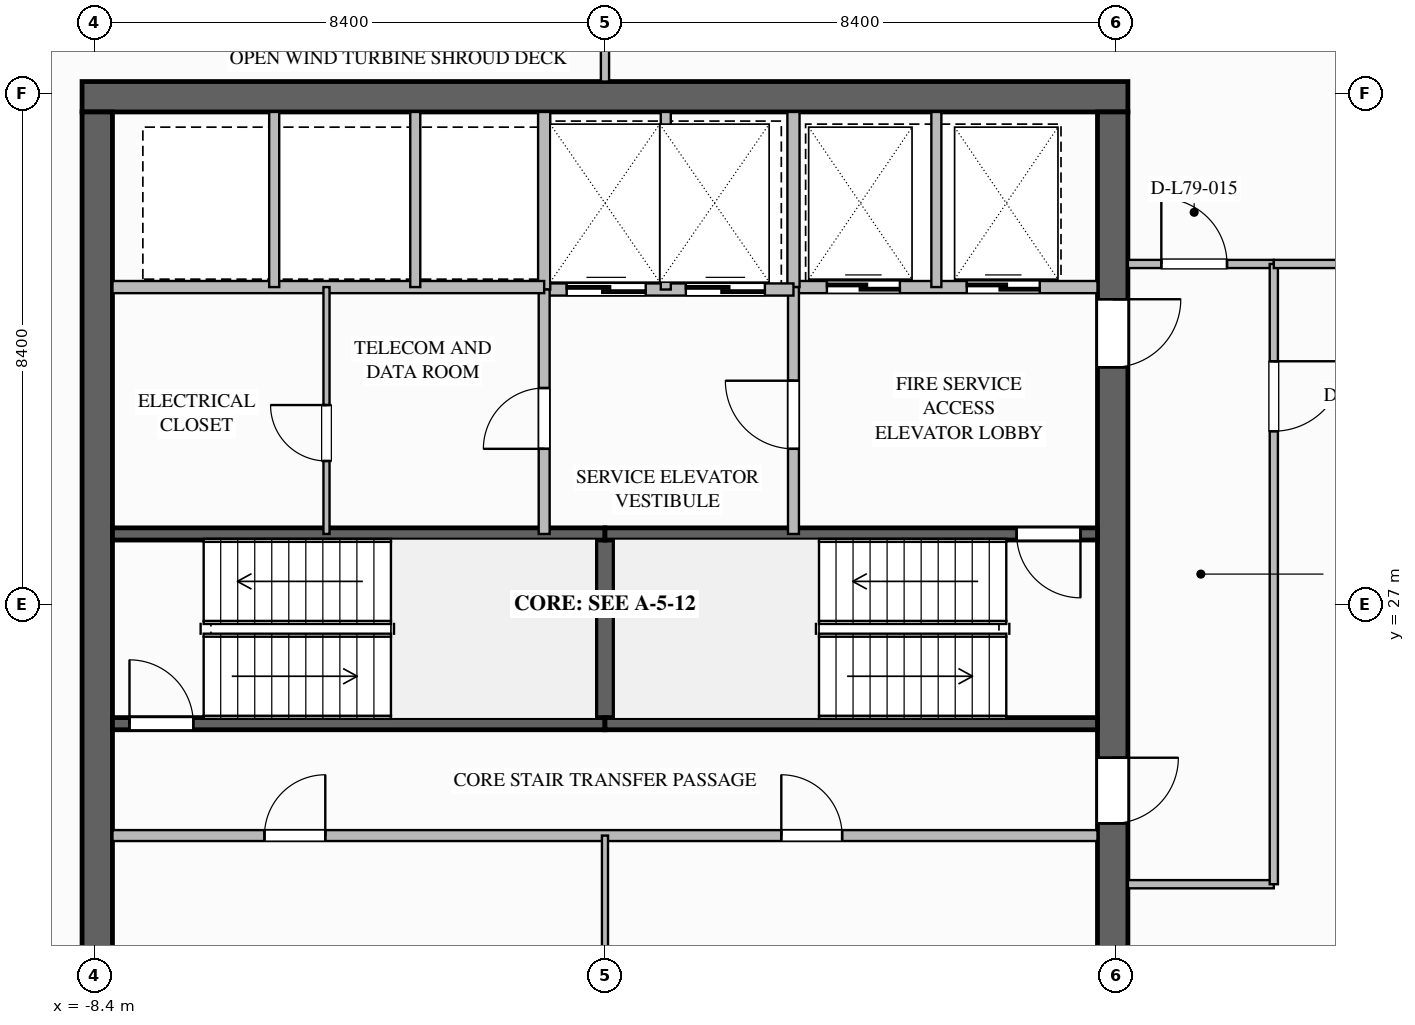
"""IFC4 building model, lengths in metres.
Left out: names, types, materials, properties, quantities, classifications, styles, units other than length and angle.
Written with IfcOpenShell. Run it as: python <this file> out.ifc"""

import sys

from ifc_helpers import new_model, si_unit, direction, frame, frame_2d, origin, place, context, subcontext, project, spatial, rectangle, extrude, element, fill, save


model = new_model("IFC4")
c1 = context("Model", 3, precision=1e-05, world=origin(), true_north=direction((0.0, 1.0)))
c2 = subcontext(c1, "Body", "Model", "MODEL_VIEW")
j1 = project(units=[si_unit("LENGTHUNIT", "METRE"), si_unit("PLANEANGLEUNIT", "RADIAN")], contexts=[c1])
p1 = place(None, origin())
s1 = spatial("IfcSite", under=j1, at=p1, CompositionType="ELEMENT")
p2 = place(p1, origin())
s2 = spatial("IfcBuilding", under=s1, at=p2, CompositionType="ELEMENT")
p3 = place(p2, frame((0.0, 0.0, 303.0)))
s3 = spatial("IfcBuildingStorey", under=s2, at=p3, CompositionType="ELEMENT", Elevation=303.0)
p4 = place(p3, frame((-8.6, 35.35, 0.0), z_axis=(0.0, 0.0, 1.0), x_axis=(1.0, 0.0, 0.0)))
e1 = element("IfcWall", 1, at=p4, inside=s3, PredefinedType="SHEAR", context=c2, shape_type="SweptSolid", body=[
    extrude(rectangle(XDim=17.2, YDim=0.5, at=frame_2d((8.6, 0.0))), origin(), (0.0, 0.0, 1.0), 4.2),
])
p5 = place(p3, frame((8.35, 35.1, 0.0), z_axis=(0.0, 0.0, 1.0), x_axis=(0.0, -1.0, 0.0)))
e2 = element("IfcWall", 2, at=p5, inside=s3, PredefinedType="SHEAR", context=c2, shape_type="SweptSolid", body=[
    extrude(rectangle(XDim=16.2, YDim=0.5, at=frame_2d((8.1, 0.0))), origin(), (0.0, 0.0, 1.0), 4.2),
])
p6 = place(p5, frame((3.08, 0.0, 0.0)))
e3 = element("IfcOpeningElement", 3, at=p6, cuts=e2, PredefinedType="OPENING", context=c2, shape_type="SweptSolid", body=[
    extrude(rectangle(XDim=1.12, YDim=2.1, at=frame_2d((0.56, 1.05))), frame((0.0, 0.26, 0.0), z_axis=(0.0, -1.0, 0.0), x_axis=(1.0, 0.0, 0.0)), (0.0, 0.0, 1.0), 0.52),
])
p7 = place(p5, frame((10.62, 0.0, 0.0)))
e4 = element("IfcOpeningElement", 4, at=p7, cuts=e2, PredefinedType="OPENING", context=c2, shape_type="SweptSolid", body=[
    extrude(rectangle(XDim=1.08, YDim=2.04, at=frame_2d((0.54, 1.02))), frame((0.0, 0.26, 0.0), z_axis=(0.0, -1.0, 0.0), x_axis=(1.0, 0.0, 0.0)), (0.0, 0.0, 1.0), 0.52),
])
p8 = place(p3, frame((-8.35, 18.9, 0.0), z_axis=(0.0, 0.0, 1.0), x_axis=(0.0, 1.0, 0.0)))
e5 = element("IfcWall", 5, at=p8, inside=s3, PredefinedType="SHEAR", context=c2, shape_type="SweptSolid", body=[
    extrude(rectangle(XDim=16.2, YDim=0.5, at=frame_2d((8.1, 0.0))), origin(), (0.0, 0.0, 1.0), 4.2),
])
p9 = place(p3, frame((0.0, 25.04, 0.0), z_axis=(0.0, 0.0, 1.0), x_axis=(0.0, 1.0, 0.0)))
e6 = element("IfcWall", 6, at=p9, inside=s3, PredefinedType="SOLIDWALL", context=c2, shape_type="SweptSolid", body=[
    extrude(rectangle(XDim=3.12, YDim=0.3, at=frame_2d((1.56, 0.0))), origin(), (0.0, 0.0, 1.0), 3.85),
])
p10 = place(p3, frame((-8.1, 25.04, 0.0), z_axis=(0.0, 0.0, 1.0), x_axis=(1.0, 0.0, 0.0)))
e7 = element("IfcWall", 7, at=p10, inside=s3, PredefinedType="SOLIDWALL", context=c2, shape_type="SweptSolid", body=[
    extrude(rectangle(XDim=8.1, YDim=0.2, at=frame_2d((4.05, 0.0))), origin(), (0.0, 0.0, 1.0), 3.85),
])
p11 = place(p10, frame((0.28, 0.0, 0.0)))
e8 = element("IfcOpeningElement", 8, at=p11, cuts=e7, PredefinedType="OPENING", context=c2, shape_type="SweptSolid", body=[
    extrude(rectangle(XDim=1.05, YDim=2.1, at=frame_2d((0.525, 1.05))), frame((0.0, 0.11, 0.0), z_axis=(0.0, -1.0, 0.0), x_axis=(1.0, 0.0, 0.0)), (0.0, 0.0, 1.0), 0.22),
])
for number, where, z_axis, x_axis in (
    (9, (-8.1, 28.16, 0.0), (0.0, 0.0, 1.0), (1.0, 0.0, 0.0)),
    (10, (0.0, 25.04, 0.0), (0.0, 0.0, 1.0), (1.0, 0.0, 0.0)),
):
    element("IfcWall", number, at=place(p3, frame(where, z_axis=z_axis, x_axis=x_axis)), inside=s3, PredefinedType="SOLIDWALL", context=c2, shape_type="SweptSolid", body=[
        extrude(rectangle(XDim=8.1, YDim=0.2, at=frame_2d((4.05, 0.0))), origin(), (0.0, 0.0, 1.0), 3.85),
    ])
p12 = place(p3, frame((8.1, 28.16, 0.0), z_axis=(0.0, 0.0, 1.0), x_axis=(-1.0, 0.0, 0.0)))
e11 = element("IfcWall", 11, at=p12, inside=s3, PredefinedType="SOLIDWALL", context=c2, shape_type="SweptSolid", body=[
    extrude(rectangle(XDim=8.1, YDim=0.2, at=frame_2d((4.05, 0.0))), origin(), (0.0, 0.0, 1.0), 3.85),
])
p13 = place(p12, frame((0.28, 0.0, 0.0)))
e12 = element("IfcOpeningElement", 12, at=p13, cuts=e11, PredefinedType="OPENING", context=c2, shape_type="SweptSolid", body=[
    extrude(rectangle(XDim=1.05, YDim=2.1, at=frame_2d((0.525, 1.05))), frame((0.0, 0.11, 0.0), z_axis=(0.0, -1.0, 0.0), x_axis=(1.0, 0.0, 0.0)), (0.0, 0.0, 1.0), 0.22),
])
p14 = place(p3, frame((3.1, 32.22, 0.0), z_axis=(0.0, 0.0, 1.0), x_axis=(1.0, 0.0, 0.0)))
e13 = element("IfcWall", 13, at=p14, inside=s3, PredefinedType="SOLIDWALL", context=c2, shape_type="SweptSolid", body=[
    extrude(rectangle(XDim=5.0, YDim=0.2, at=frame_2d((2.5, 0.0))), origin(), (0.0, 0.0, 1.0), 3.85),
])
p15 = place(p14, frame((0.55, 0.0, 0.0)))
e14 = element("IfcOpeningElement", 14, at=p15, cuts=e13, PredefinedType="OPENING", context=c2, shape_type="SweptSolid", body=[
    extrude(rectangle(XDim=1.2, YDim=2.2, at=frame_2d((0.6, 1.1))), frame((0.0, 0.11, 0.0), z_axis=(0.0, -1.0, 0.0), x_axis=(1.0, 0.0, 0.0)), (0.0, 0.0, 1.0), 0.22),
])
p16 = place(p14, frame((2.85, 0.0, 0.0)))
e15 = element("IfcOpeningElement", 15, at=p16, cuts=e13, PredefinedType="OPENING", context=c2, shape_type="SweptSolid", body=[
    extrude(rectangle(XDim=1.2, YDim=2.2, at=frame_2d((0.6, 1.1))), frame((0.0, 0.11, 0.0), z_axis=(0.0, -1.0, 0.0), x_axis=(1.0, 0.0, 0.0)), (0.0, 0.0, 1.0), 0.22),
])
p17 = place(p3, frame((3.1, 32.22, 0.0), z_axis=(0.0, 0.0, 1.0), x_axis=(0.0, 1.0, 0.0)))
e16 = element("IfcWall", 16, at=p17, inside=s3, PredefinedType="SOLIDWALL", context=c2, shape_type="SweptSolid", body=[
    extrude(rectangle(XDim=2.88, YDim=0.2, at=frame_2d((1.44, 0.0))), origin(), (0.0, 0.0, 1.0), 3.85),
])
p18 = place(p3, frame((5.45, 32.22, 0.0), z_axis=(0.0, 0.0, 1.0), x_axis=(0.0, 1.0, 0.0)))
e17 = element("IfcWall", 17, at=p18, inside=s3, PredefinedType="PARTITIONING", context=c2, shape_type="SweptSolid", body=[
    extrude(rectangle(XDim=2.88, YDim=0.165, at=frame_2d((1.44, 0.0))), origin(), (0.0, 0.0, 1.0), 3.85),
])
p19 = place(p3, frame((3.1, 28.16, 0.0), z_axis=(0.0, 0.0, 1.0), x_axis=(0.0, 1.0, 0.0)))
e18 = element("IfcWall", 18, at=p19, inside=s3, PredefinedType="SOLIDWALL", context=c2, shape_type="SweptSolid", body=[
    extrude(rectangle(XDim=4.06, YDim=0.18, at=frame_2d((2.03, 0.0))), origin(), (0.0, 0.0, 1.0), 3.85),
])
p20 = place(p19, frame((1.4, 0.0, 0.0)))
e19 = element("IfcOpeningElement", 19, at=p20, cuts=e18, PredefinedType="OPENING", context=c2, shape_type="SweptSolid", body=[
    extrude(rectangle(XDim=1.12, YDim=2.1, at=frame_2d((0.56, 1.05))), frame((0.0, 0.1, 0.0), z_axis=(0.0, -1.0, 0.0), x_axis=(1.0, 0.0, 0.0)), (0.0, 0.0, 1.0), 0.2),
])
p21 = place(p3, frame((-1.0, 32.18, 0.0), z_axis=(0.0, 0.0, 1.0), x_axis=(1.0, 0.0, 0.0)))
e20 = element("IfcWall", 20, at=p21, inside=s3, PredefinedType="SOLIDWALL", context=c2, shape_type="SweptSolid", body=[
    extrude(rectangle(XDim=4.1, YDim=0.2, at=frame_2d((2.05, 0.0))), origin(), (0.0, 0.0, 1.0), 3.85),
])
p22 = place(p21, frame((0.37, 0.0, 0.0)))
e21 = element("IfcOpeningElement", 21, at=p22, cuts=e20, PredefinedType="OPENING", context=c2, shape_type="SweptSolid", body=[
    extrude(rectangle(XDim=1.3, YDim=2.2, at=frame_2d((0.65, 1.1))), frame((0.0, 0.11, 0.0), z_axis=(0.0, -1.0, 0.0), x_axis=(1.0, 0.0, 0.0)), (0.0, 0.0, 1.0), 0.22),
])
p23 = place(p21, frame((2.33, 0.0, 0.0)))
e22 = element("IfcOpeningElement", 22, at=p23, cuts=e20, PredefinedType="OPENING", context=c2, shape_type="SweptSolid", body=[
    extrude(rectangle(XDim=1.3, YDim=2.2, at=frame_2d((0.65, 1.1))), frame((0.0, 0.11, 0.0), z_axis=(0.0, -1.0, 0.0), x_axis=(1.0, 0.0, 0.0)), (0.0, 0.0, 1.0), 0.22),
])
p24 = place(p3, frame((-1.0, 32.18, 0.0), z_axis=(0.0, 0.0, 1.0), x_axis=(0.0, 1.0, 0.0)))
e23 = element("IfcWall", 23, at=p24, inside=s3, PredefinedType="SOLIDWALL", context=c2, shape_type="SweptSolid", body=[
    extrude(rectangle(XDim=2.92, YDim=0.2, at=frame_2d((1.46, 0.0))), origin(), (0.0, 0.0, 1.0), 3.85),
])
p25 = place(p3, frame((1.0, 32.18, 0.0), z_axis=(0.0, 0.0, 1.0), x_axis=(0.0, 1.0, 0.0)))
e24 = element("IfcWall", 24, at=p25, inside=s3, PredefinedType="PARTITIONING", context=c2, shape_type="SweptSolid", body=[
    extrude(rectangle(XDim=2.92, YDim=0.165, at=frame_2d((1.46, 0.0))), origin(), (0.0, 0.0, 1.0), 3.85),
])
p26 = place(p3, frame((-1.0, 28.16, 0.0), z_axis=(0.0, 0.0, 1.0), x_axis=(0.0, 1.0, 0.0)))
e25 = element("IfcWall", 25, at=p26, inside=s3, PredefinedType="SOLIDWALL", context=c2, shape_type="SweptSolid", body=[
    extrude(rectangle(XDim=4.02, YDim=0.18, at=frame_2d((2.01, 0.0))), origin(), (0.0, 0.0, 1.0), 3.85),
])
p27 = place(p26, frame((1.4, 0.0, 0.0)))
e26 = element("IfcOpeningElement", 26, at=p27, cuts=e25, PredefinedType="OPENING", context=c2, shape_type="SweptSolid", body=[
    extrude(rectangle(XDim=1.0, YDim=2.1, at=frame_2d((0.5, 1.05))), frame((0.0, 0.1, 0.0), z_axis=(0.0, -1.0, 0.0), x_axis=(1.0, 0.0, 0.0)), (0.0, 0.0, 1.0), 0.2),
])
p28 = place(p3, frame((-8.1, 32.22, 0.0), z_axis=(0.0, 0.0, 1.0), x_axis=(1.0, 0.0, 0.0)))
e27 = element("IfcWall", 27, at=p28, inside=s3, PredefinedType="SOLIDWALL", context=c2, shape_type="SweptSolid", body=[
    extrude(rectangle(XDim=7.1, YDim=0.2, at=frame_2d((3.55, 0.0))), origin(), (0.0, 0.0, 1.0), 3.85),
])
for number, where, z_axis, x_axis in (
    (28, (-5.44, 32.22, 0.0), (0.0, 0.0, 1.0), (0.0, 1.0, 0.0)),
    (29, (-3.12, 32.22, 0.0), (0.0, 0.0, 1.0), (0.0, 1.0, 0.0)),
):
    element("IfcWall", number, at=place(p3, frame(where, z_axis=z_axis, x_axis=x_axis)), inside=s3, PredefinedType="PARTITIONING", context=c2, shape_type="SweptSolid", body=[
        extrude(rectangle(XDim=2.88, YDim=0.165, at=frame_2d((1.44, 0.0))), origin(), (0.0, 0.0, 1.0), 3.85),
    ])
p29 = place(p3, frame((-4.58, 28.16, 0.0), z_axis=(0.0, 0.0, 1.0), x_axis=(0.0, 1.0, 0.0)))
e30 = element("IfcWall", 30, at=p29, inside=s3, PredefinedType="PARTITIONING", context=c2, shape_type="SweptSolid", body=[
    extrude(rectangle(XDim=4.06, YDim=0.1, at=frame_2d((2.03, 0.0))), origin(), (0.0, 0.0, 1.0), 3.85),
])
p30 = place(p29, frame((1.2, 0.0, 0.0)))
e31 = element("IfcOpeningElement", 31, at=p30, cuts=e30, PredefinedType="OPENING", context=c2, shape_type="SweptSolid", body=[
    extrude(rectangle(XDim=0.92, YDim=2.1, at=frame_2d((0.46, 1.05))), frame((0.0, 0.06, 0.0), z_axis=(0.0, -1.0, 0.0), x_axis=(1.0, 0.0, 0.0)), (0.0, 0.0, 1.0), 0.12),
])
p31 = place(p3, frame((-8.1, 23.2, 0.0), z_axis=(0.0, 0.0, 1.0), x_axis=(1.0, 0.0, 0.0)))
e32 = element("IfcWall", 32, at=p31, inside=s3, PredefinedType="SOLIDWALL", context=c2, shape_type="SweptSolid", body=[
    extrude(rectangle(XDim=16.2, YDim=0.18, at=frame_2d((8.1, 0.0))), origin(), (0.0, 0.0, 1.0), 3.85),
])
p32 = place(p31, frame((2.5, 0.0, 0.0)))
e33 = element("IfcOpeningElement", 33, at=p32, cuts=e32, PredefinedType="OPENING", context=c2, shape_type="SweptSolid", body=[
    extrude(rectangle(XDim=1.0, YDim=2.1, at=frame_2d((0.5, 1.05))), frame((0.0, 0.1, 0.0), z_axis=(0.0, -1.0, 0.0), x_axis=(1.0, 0.0, 0.0)), (0.0, 0.0, 1.0), 0.2),
])
p33 = place(p31, frame((11.0, 0.0, 0.0)))
e34 = element("IfcOpeningElement", 34, at=p33, cuts=e32, PredefinedType="OPENING", context=c2, shape_type="SweptSolid", body=[
    extrude(rectangle(XDim=1.0, YDim=2.1, at=frame_2d((0.5, 1.05))), frame((0.0, 0.1, 0.0), z_axis=(0.0, -1.0, 0.0), x_axis=(1.0, 0.0, 0.0)), (0.0, 0.0, 1.0), 0.2),
])
p34 = place(p3, frame((0.0, 18.9, 0.0), z_axis=(0.0, 0.0, 1.0), x_axis=(0.0, 1.0, 0.0)))
e35 = element("IfcWall", 35, at=p34, inside=s3, PredefinedType="PARTITIONING", context=c2, shape_type="SweptSolid", body=[
    extrude(rectangle(XDim=4.3, YDim=0.1, at=frame_2d((2.15, 0.0))), origin(), (0.0, 0.0, 1.0), 3.85),
])
p35 = place(p3, frame((8.6, 22.4, 0.0), z_axis=(0.0, 0.0, 1.0), x_axis=(1.0, 0.0, 0.0)))
e36 = element("IfcWall", 36, at=p35, inside=s3, PredefinedType="PARTITIONING", context=c2, shape_type="SweptSolid", body=[
    extrude(rectangle(XDim=2.4, YDim=0.135, at=frame_2d((1.2, 0.0))), origin(), (0.0, 0.0, 1.0), 3.85),
])
p36 = place(p3, frame((8.6, 32.6, 0.0), z_axis=(0.0, 0.0, 1.0), x_axis=(1.0, 0.0, 0.0)))
e37 = element("IfcWall", 37, at=p36, inside=s3, PredefinedType="PARTITIONING", context=c2, shape_type="SweptSolid", body=[
    extrude(rectangle(XDim=2.4, YDim=0.135, at=frame_2d((1.2, 0.0))), origin(), (0.0, 0.0, 1.0), 3.85),
])
p37 = place(p36, frame((0.55, 0.0, 0.0)))
e38 = element("IfcOpeningElement", 38, at=p37, cuts=e37, PredefinedType="OPENING", context=c2, shape_type="SweptSolid", body=[
    extrude(rectangle(XDim=1.08, YDim=2.04, at=frame_2d((0.54, 1.02))), frame((0.0, 0.077, 0.0), z_axis=(0.0, -1.0, 0.0), x_axis=(1.0, 0.0, 0.0)), (0.0, 0.0, 1.0), 0.155),
])
p38 = place(p3, frame((11.0, 32.6, 0.0), z_axis=(0.0, 0.0, 1.0), x_axis=(0.0, -1.0, 0.0)))
e39 = element("IfcWall", 39, at=p38, inside=s3, PredefinedType="PARTITIONING", context=c2, shape_type="SweptSolid", body=[
    extrude(rectangle(XDim=10.2, YDim=0.135, at=frame_2d((5.1, 0.0))), origin(), (0.0, 0.0, 1.0), 3.85),
])
p39 = place(p38, frame((1.6, 0.0, 0.0)))
e40 = element("IfcOpeningElement", 40, at=p39, cuts=e39, PredefinedType="OPENING", context=c2, shape_type="SweptSolid", body=[
    extrude(rectangle(XDim=1.15, YDim=2.15, at=frame_2d((0.575, 1.075))), frame((0.0, 0.077, 0.0), z_axis=(0.0, -1.0, 0.0), x_axis=(1.0, 0.0, 0.0)), (0.0, 0.0, 1.0), 0.155),
])
p40 = place(p3, frame((11.0, 32.6, 0.0), z_axis=(0.0, 0.0, 1.0), x_axis=(1.0, 0.0, 0.0)))
e41 = element("IfcWall", 41, at=p40, inside=s3, PredefinedType="PARTITIONING", context=c2, shape_type="SweptSolid", body=[
    extrude(rectangle(XDim=4.8, YDim=0.135, at=frame_2d((2.4, 0.0))), origin(), (0.0, 0.0, 1.0), 3.85),
])
p41 = place(p3, frame((0.0, 35.6, 0.0), z_axis=(0.0, 0.0, 1.0), x_axis=(0.0, 1.0, 0.0)))
e42 = element("IfcWall", 42, at=p41, inside=s3, PredefinedType="PARTITIONING", context=c2, shape_type="SweptSolid", body=[
    extrude(rectangle(XDim=7.2, YDim=0.135, at=frame_2d((3.6, 0.0))), origin(), (0.0, 0.0, 1.0), 3.227),
])
p42 = place(p41, frame((2.2, 0.0, 0.0)))
e43 = element("IfcOpeningElement", 43, at=p42, cuts=e42, PredefinedType="OPENING", context=c2, shape_type="SweptSolid", body=[
    extrude(rectangle(XDim=1.36, YDim=2.2, at=frame_2d((0.68, 1.1))), frame((0.0, 0.077, 0.0), z_axis=(0.0, -1.0, 0.0), x_axis=(1.0, 0.0, 0.0)), (0.0, 0.0, 1.0), 0.155),
])
p43 = place(p11, origin())
e44 = element("IfcDoor", 44, at=p43, inside=s3, OperationType="SINGLE_SWING_LEFT", PredefinedType="DOOR", context=c2, shape_type="SweptSolid", body=[
    extrude(rectangle(XDim=1.05, YDim=2.1, at=frame_2d((0.525, 1.05))), frame((0.0, 0.025, 0.0), z_axis=(0.0, -1.0, 0.0), x_axis=(1.0, 0.0, 0.0)), (0.0, 0.0, 1.0), 0.05),
])
fill(e8, e44)
p44 = place(p13, origin())
e45 = element("IfcDoor", 45, at=p44, inside=s3, OperationType="SINGLE_SWING_LEFT", PredefinedType="DOOR", context=c2, shape_type="SweptSolid", body=[
    extrude(rectangle(XDim=1.05, YDim=2.1, at=frame_2d((0.525, 1.05))), frame((0.0, 0.025, 0.0), z_axis=(0.0, -1.0, 0.0), x_axis=(1.0, 0.0, 0.0)), (0.0, 0.0, 1.0), 0.05),
])
fill(e12, e45)
p45 = place(p15, origin())
e46 = element("IfcDoor", 46, at=p45, inside=s3, OperationType="SLIDING_TO_LEFT", PredefinedType="DOOR", context=c2, shape_type="SweptSolid", body=[
    extrude(rectangle(XDim=1.2, YDim=2.2, at=frame_2d((0.6, 1.1))), frame((0.0, 0.025, 0.0), z_axis=(0.0, -1.0, 0.0), x_axis=(1.0, 0.0, 0.0)), (0.0, 0.0, 1.0), 0.05),
])
fill(e14, e46)
p46 = place(p16, origin())
e47 = element("IfcDoor", 47, at=p46, inside=s3, OperationType="SLIDING_TO_LEFT", PredefinedType="DOOR", context=c2, shape_type="SweptSolid", body=[
    extrude(rectangle(XDim=1.2, YDim=2.2, at=frame_2d((0.6, 1.1))), frame((0.0, 0.025, 0.0), z_axis=(0.0, -1.0, 0.0), x_axis=(1.0, 0.0, 0.0)), (0.0, 0.0, 1.0), 0.05),
])
fill(e15, e47)
p47 = place(p20, origin())
e48 = element("IfcDoor", 48, at=p47, inside=s3, OperationType="SINGLE_SWING_RIGHT", PredefinedType="DOOR", context=c2, shape_type="SweptSolid", body=[
    extrude(rectangle(XDim=1.12, YDim=2.1, at=frame_2d((0.56, 1.05))), frame((0.0, 0.025, 0.0), z_axis=(0.0, -1.0, 0.0), x_axis=(1.0, 0.0, 0.0)), (0.0, 0.0, 1.0), 0.05),
])
fill(e19, e48)
p48 = place(p6, origin())
e49 = element("IfcDoor", 49, at=p48, inside=s3, OperationType="SINGLE_SWING_LEFT", PredefinedType="DOOR", context=c2, shape_type="SweptSolid", body=[
    extrude(rectangle(XDim=1.12, YDim=2.1, at=frame_2d((0.56, 1.05))), frame((0.0, 0.025, 0.0), z_axis=(0.0, -1.0, 0.0), x_axis=(1.0, 0.0, 0.0)), (0.0, 0.0, 1.0), 0.05),
])
fill(e3, e49)
p49 = place(p22, origin())
e50 = element("IfcDoor", 50, at=p49, inside=s3, OperationType="SLIDING_TO_LEFT", PredefinedType="DOOR", context=c2, shape_type="SweptSolid", body=[
    extrude(rectangle(XDim=1.3, YDim=2.2, at=frame_2d((0.65, 1.1))), frame((0.0, 0.025, 0.0), z_axis=(0.0, -1.0, 0.0), x_axis=(1.0, 0.0, 0.0)), (0.0, 0.0, 1.0), 0.05),
])
fill(e21, e50)
p50 = place(p23, origin())
e51 = element("IfcDoor", 51, at=p50, inside=s3, OperationType="SLIDING_TO_LEFT", PredefinedType="DOOR", context=c2, shape_type="SweptSolid", body=[
    extrude(rectangle(XDim=1.3, YDim=2.2, at=frame_2d((0.65, 1.1))), frame((0.0, 0.025, 0.0), z_axis=(0.0, -1.0, 0.0), x_axis=(1.0, 0.0, 0.0)), (0.0, 0.0, 1.0), 0.05),
])
fill(e22, e51)
p51 = place(p27, origin())
e52 = element("IfcDoor", 52, at=p51, inside=s3, OperationType="SINGLE_SWING_LEFT", PredefinedType="DOOR", context=c2, shape_type="SweptSolid", body=[
    extrude(rectangle(XDim=1.0, YDim=2.1, at=frame_2d((0.5, 1.05))), frame((0.0, 0.025, 0.0), z_axis=(0.0, -1.0, 0.0), x_axis=(1.0, 0.0, 0.0)), (0.0, 0.0, 1.0), 0.05),
])
fill(e26, e52)
p52 = place(p30, origin())
e53 = element("IfcDoor", 53, at=p52, inside=s3, OperationType="SINGLE_SWING_RIGHT", PredefinedType="DOOR", context=c2, shape_type="SweptSolid", body=[
    extrude(rectangle(XDim=0.92, YDim=2.1, at=frame_2d((0.46, 1.05))), frame((0.0, 0.025, 0.0), z_axis=(0.0, -1.0, 0.0), x_axis=(1.0, 0.0, 0.0)), (0.0, 0.0, 1.0), 0.05),
])
fill(e31, e53)
p53 = place(p7, origin())
e54 = element("IfcDoor", 54, at=p53, inside=s3, OperationType="SINGLE_SWING_LEFT", PredefinedType="DOOR", context=c2, shape_type="SweptSolid", body=[
    extrude(rectangle(XDim=1.08, YDim=2.04, at=frame_2d((0.54, 1.02))), frame((0.0, 0.025, 0.0), z_axis=(0.0, -1.0, 0.0), x_axis=(1.0, 0.0, 0.0)), (0.0, 0.0, 1.0), 0.05),
])
fill(e4, e54)
p54 = place(p32, origin())
e55 = element("IfcDoor", 55, at=p54, inside=s3, OperationType="SINGLE_SWING_RIGHT", PredefinedType="DOOR", context=c2, shape_type="SweptSolid", body=[
    extrude(rectangle(XDim=1.0, YDim=2.1, at=frame_2d((0.5, 1.05))), frame((0.0, 0.025, 0.0), z_axis=(0.0, -1.0, 0.0), x_axis=(1.0, 0.0, 0.0)), (0.0, 0.0, 1.0), 0.05),
])
fill(e33, e55)
p55 = place(p33, origin())
e56 = element("IfcDoor", 56, at=p55, inside=s3, OperationType="SINGLE_SWING_LEFT", PredefinedType="DOOR", context=c2, shape_type="SweptSolid", body=[
    extrude(rectangle(XDim=1.0, YDim=2.1, at=frame_2d((0.5, 1.05))), frame((0.0, 0.025, 0.0), z_axis=(0.0, -1.0, 0.0), x_axis=(1.0, 0.0, 0.0)), (0.0, 0.0, 1.0), 0.05),
])
fill(e34, e56)
p56 = place(p37, origin())
e57 = element("IfcDoor", 57, at=p56, inside=s3, OperationType="SINGLE_SWING_LEFT", PredefinedType="DOOR", context=c2, shape_type="SweptSolid", body=[
    extrude(rectangle(XDim=1.08, YDim=2.04, at=frame_2d((0.54, 1.02))), frame((0.0, 0.025, 0.0), z_axis=(0.0, -1.0, 0.0), x_axis=(1.0, 0.0, 0.0)), (0.0, 0.0, 1.0), 0.05),
])
fill(e38, e57)
p57 = place(p39, origin())
e58 = element("IfcDoor", 58, at=p57, inside=s3, OperationType="SINGLE_SWING_LEFT", PredefinedType="DOOR", context=c2, shape_type="SweptSolid", body=[
    extrude(rectangle(XDim=1.15, YDim=2.15, at=frame_2d((0.575, 1.075))), frame((0.0, 0.025, 0.0), z_axis=(0.0, -1.0, 0.0), x_axis=(1.0, 0.0, 0.0)), (0.0, 0.0, 1.0), 0.05),
])
fill(e40, e58)
save(model, sys.argv[1])
